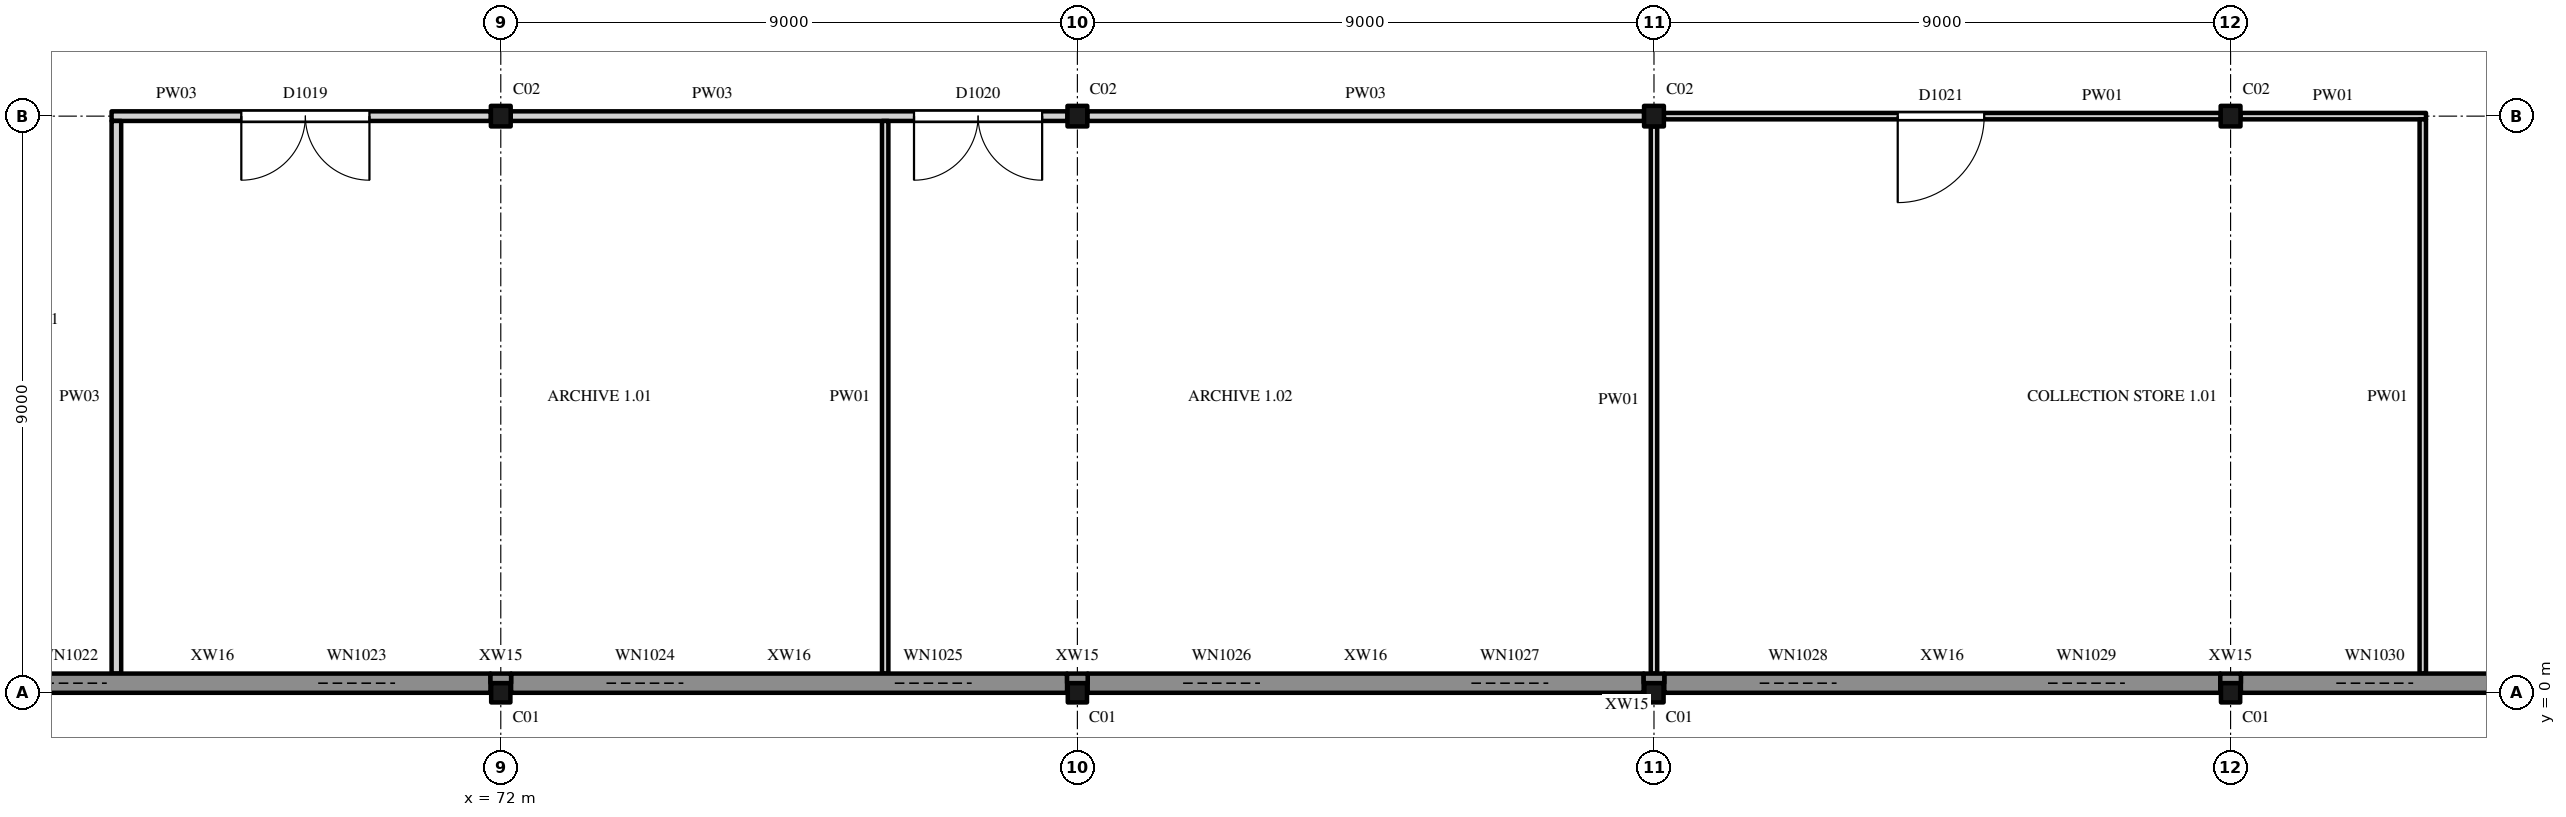
"""IFC4 building model, lengths in metres.
Left out: names, types, materials, properties, quantities, classifications, styles, units other than length and angle.
Written with IfcOpenShell. Run it as: python <this file> out.ifc"""

import sys

from ifc_helpers import new_model, si_unit, direction, frame, frame_2d, origin, origin_2d, place, context, subcontext, project, spatial, rectangle, hollow_rectangle, i_section, extrude, element, fill, save


model = new_model("IFC4")
c1 = context("Model", 3, precision=1e-05, world=origin(), true_north=direction((0.0, 1.0)))
c2 = subcontext(c1, "Body", "Model", "MODEL_VIEW")
j1 = project(units=[si_unit("LENGTHUNIT", "METRE"), si_unit("PLANEANGLEUNIT", "RADIAN")], contexts=[c1])
p1 = place(None, origin())
s1 = spatial("IfcSite", under=j1, at=p1, CompositionType="ELEMENT")
p2 = place(p1, origin())
s2 = spatial("IfcBuilding", under=s1, at=p2, CompositionType="ELEMENT")
p3 = place(p2, frame((0.0, 0.0, 6.0)))
s3 = spatial("IfcBuildingStorey", under=s2, at=p3, CompositionType="ELEMENT", Elevation=6.0)
for number, where, z_axis, x_axis in (
    (1, (72.0, 0.0, 0.0), (0.0, 0.0, 1.0), (1.0, 0.0, 0.0)),
    (2, (81.0, 0.0, 0.0), (0.0, 0.0, 1.0), (1.0, 0.0, 0.0)),
    (3, (90.0, 0.0, 0.0), (0.0, 0.0, 1.0), (1.0, 0.0, 0.0)),
    (4, (99.0, 0.0, 0.0), (0.0, 0.0, 1.0), (1.0, 0.0, 0.0)),
):
    element("IfcColumn", number, at=place(p3, frame(where, z_axis=z_axis, x_axis=x_axis)), inside=s3, PredefinedType="COLUMN", context=c2, shape_type="SweptSolid", body=[
        extrude(hollow_rectangle(XDim=0.3, YDim=0.3, WallThickness=0.012, InnerFilletRadius=0.019, OuterFilletRadius=0.031, at=origin_2d()), origin(), (0.0, 0.0, 1.0), 5.0),
    ])
for number, where, z_axis, x_axis in (
    (5, (72.0, 9.0, 0.0), (0.0, 0.0, 1.0), (1.0, 0.0, 0.0)),
    (6, (81.0, 9.0, 0.0), (0.0, 0.0, 1.0), (1.0, 0.0, 0.0)),
    (7, (90.0, 9.0, 0.0), (0.0, 0.0, 1.0), (1.0, 0.0, 0.0)),
    (8, (99.0, 9.0, 0.0), (0.0, 0.0, 1.0), (1.0, 0.0, 0.0)),
):
    element("IfcColumn", number, at=place(p3, frame(where, z_axis=z_axis, x_axis=x_axis)), inside=s3, PredefinedType="COLUMN", context=c2, shape_type="SweptSolid", body=[
        extrude(i_section(OverallWidth=0.309, OverallDepth=0.321, WebThickness=0.014, FlangeThickness=0.022, FilletRadius=0.017, at=origin_2d()), origin(), (0.0, 0.0, 1.0), 5.0),
    ])
p4 = place(p3, frame((63.172, 0.15, 0.0), z_axis=(0.0, 0.0, 1.0), x_axis=(1.0, 0.0, 0.0)))
e9 = element("IfcWall", 9, at=p4, inside=s3, PredefinedType="SOLIDWALL", context=c2, shape_type="SweptSolid", body=[
    extrude(rectangle(XDim=8.667, YDim=0.3, at=frame_2d((4.333, 0.0))), origin(), (0.0, 0.0, 1.0), 4.419),
])
p5 = place(p4, frame((1.478, 0.0, 1.2)))
e10 = element("IfcOpeningElement", 10, at=p5, cuts=e9, PredefinedType="OPENING", context=c2, shape_type="SweptSolid", body=[
    extrude(rectangle(XDim=1.2, YDim=1.5, at=frame_2d((0.6, 0.75))), frame((0.0, 0.16, 0.0), z_axis=(0.0, -1.0, 0.0), x_axis=(1.0, 0.0, 0.0)), (0.0, 0.0, 1.0), 0.32),
])
p6 = place(p4, frame((5.978, 0.0, 1.2)))
e11 = element("IfcOpeningElement", 11, at=p6, cuts=e9, PredefinedType="OPENING", context=c2, shape_type="SweptSolid", body=[
    extrude(rectangle(XDim=1.2, YDim=1.5, at=frame_2d((0.6, 0.75))), frame((0.0, 0.16, 0.0), z_axis=(0.0, -1.0, 0.0), x_axis=(1.0, 0.0, 0.0)), (0.0, 0.0, 1.0), 0.32),
])
p7 = place(p3, frame((72.161, 0.15, 0.0), z_axis=(0.0, 0.0, 1.0), x_axis=(1.0, 0.0, 0.0)))
e12 = element("IfcWall", 12, at=p7, inside=s3, PredefinedType="SOLIDWALL", context=c2, shape_type="SweptSolid", body=[
    extrude(rectangle(XDim=8.678, YDim=0.3, at=frame_2d((4.339, 0.0))), origin(), (0.0, 0.0, 1.0), 4.419),
])
p8 = place(p7, frame((1.489, 0.0, 1.2)))
e13 = element("IfcOpeningElement", 13, at=p8, cuts=e12, PredefinedType="OPENING", context=c2, shape_type="SweptSolid", body=[
    extrude(rectangle(XDim=1.2, YDim=1.5, at=frame_2d((0.6, 0.75))), frame((0.0, 0.16, 0.0), z_axis=(0.0, -1.0, 0.0), x_axis=(1.0, 0.0, 0.0)), (0.0, 0.0, 1.0), 0.32),
])
p9 = place(p7, frame((5.989, 0.0, 1.2)))
e14 = element("IfcOpeningElement", 14, at=p9, cuts=e12, PredefinedType="OPENING", context=c2, shape_type="SweptSolid", body=[
    extrude(rectangle(XDim=1.2, YDim=1.5, at=frame_2d((0.6, 0.75))), frame((0.0, 0.16, 0.0), z_axis=(0.0, -1.0, 0.0), x_axis=(1.0, 0.0, 0.0)), (0.0, 0.0, 1.0), 0.32),
])
p10 = place(p3, frame((81.161, 0.15, 0.0), z_axis=(0.0, 0.0, 1.0), x_axis=(1.0, 0.0, 0.0)))
e15 = element("IfcWall", 15, at=p10, inside=s3, PredefinedType="SOLIDWALL", context=c2, shape_type="SweptSolid", body=[
    extrude(rectangle(XDim=8.678, YDim=0.3, at=frame_2d((4.339, 0.0))), origin(), (0.0, 0.0, 1.0), 4.419),
])
p11 = place(p10, frame((1.489, 0.0, 1.2)))
e16 = element("IfcOpeningElement", 16, at=p11, cuts=e15, PredefinedType="OPENING", context=c2, shape_type="SweptSolid", body=[
    extrude(rectangle(XDim=1.2, YDim=1.5, at=frame_2d((0.6, 0.75))), frame((0.0, 0.16, 0.0), z_axis=(0.0, -1.0, 0.0), x_axis=(1.0, 0.0, 0.0)), (0.0, 0.0, 1.0), 0.32),
])
p12 = place(p10, frame((5.989, 0.0, 1.2)))
e17 = element("IfcOpeningElement", 17, at=p12, cuts=e15, PredefinedType="OPENING", context=c2, shape_type="SweptSolid", body=[
    extrude(rectangle(XDim=1.2, YDim=1.5, at=frame_2d((0.6, 0.75))), frame((0.0, 0.16, 0.0), z_axis=(0.0, -1.0, 0.0), x_axis=(1.0, 0.0, 0.0)), (0.0, 0.0, 1.0), 0.32),
])
p13 = place(p3, frame((90.161, 0.15, 0.0), z_axis=(0.0, 0.0, 1.0), x_axis=(1.0, 0.0, 0.0)))
e18 = element("IfcWall", 18, at=p13, inside=s3, PredefinedType="SOLIDWALL", context=c2, shape_type="SweptSolid", body=[
    extrude(rectangle(XDim=8.678, YDim=0.3, at=frame_2d((4.339, 0.0))), origin(), (0.0, 0.0, 1.0), 4.419),
])
p14 = place(p13, frame((1.489, 0.0, 1.2)))
e19 = element("IfcOpeningElement", 19, at=p14, cuts=e18, PredefinedType="OPENING", context=c2, shape_type="SweptSolid", body=[
    extrude(rectangle(XDim=1.2, YDim=1.5, at=frame_2d((0.6, 0.75))), frame((0.0, 0.16, 0.0), z_axis=(0.0, -1.0, 0.0), x_axis=(1.0, 0.0, 0.0)), (0.0, 0.0, 1.0), 0.32),
])
p15 = place(p13, frame((5.989, 0.0, 1.2)))
e20 = element("IfcOpeningElement", 20, at=p15, cuts=e18, PredefinedType="OPENING", context=c2, shape_type="SweptSolid", body=[
    extrude(rectangle(XDim=1.2, YDim=1.5, at=frame_2d((0.6, 0.75))), frame((0.0, 0.16, 0.0), z_axis=(0.0, -1.0, 0.0), x_axis=(1.0, 0.0, 0.0)), (0.0, 0.0, 1.0), 0.32),
])
p16 = place(p3, frame((99.161, 0.15, 0.0), z_axis=(0.0, 0.0, 1.0), x_axis=(1.0, 0.0, 0.0)))
e21 = element("IfcWall", 21, at=p16, inside=s3, PredefinedType="SOLIDWALL", context=c2, shape_type="SweptSolid", body=[
    extrude(rectangle(XDim=8.667, YDim=0.3, at=frame_2d((4.333, 0.0))), origin(), (0.0, 0.0, 1.0), 4.419),
])
p17 = place(p16, frame((1.489, 0.0, 1.2)))
e22 = element("IfcOpeningElement", 22, at=p17, cuts=e21, PredefinedType="OPENING", context=c2, shape_type="SweptSolid", body=[
    extrude(rectangle(XDim=1.2, YDim=1.5, at=frame_2d((0.6, 0.75))), frame((0.0, 0.16, 0.0), z_axis=(0.0, -1.0, 0.0), x_axis=(1.0, 0.0, 0.0)), (0.0, 0.0, 1.0), 0.32),
])
p18 = place(p16, frame((5.989, 0.0, 1.2)))
e23 = element("IfcOpeningElement", 23, at=p18, cuts=e21, PredefinedType="OPENING", context=c2, shape_type="SweptSolid", body=[
    extrude(rectangle(XDim=1.2, YDim=1.5, at=frame_2d((0.6, 0.75))), frame((0.0, 0.16, 0.0), z_axis=(0.0, -1.0, 0.0), x_axis=(1.0, 0.0, 0.0)), (0.0, 0.0, 1.0), 0.32),
])
for number, where, z_axis, x_axis in (
    (24, (71.839, 0.225, 0.0), (0.0, 0.0, 1.0), (1.0, 0.0, 0.0)),
    (25, (80.839, 0.225, 0.0), (0.0, 0.0, 1.0), (1.0, 0.0, 0.0)),
    (26, (89.839, 0.225, 0.0), (0.0, 0.0, 1.0), (1.0, 0.0, 0.0)),
    (27, (98.839, 0.225, 0.0), (0.0, 0.0, 1.0), (1.0, 0.0, 0.0)),
):
    element("IfcWall", number, at=place(p3, frame(where, z_axis=z_axis, x_axis=x_axis)), inside=s3, PredefinedType="SOLIDWALL", context=c2, shape_type="SweptSolid", body=[
        extrude(rectangle(XDim=0.322, YDim=0.15, at=frame_2d((0.161, 0.0))), origin(), (0.0, 0.0, 1.0), 4.419),
    ])
p19 = place(p3, frame((65.925, 9.0, 0.0), z_axis=(0.0, 0.0, 1.0), x_axis=(1.0, 0.0, 0.0)))
e28 = element("IfcWall", 28, at=p19, inside=s3, PredefinedType="PARTITIONING", context=c2, shape_type="SweptSolid", body=[
    extrude(rectangle(XDim=5.92, YDim=0.15, at=frame_2d((2.96, 0.0))), origin(), (0.0, 0.0, 1.0), 4.419),
])
p20 = place(p19, frame((2.025, 0.0, 0.0)))
e29 = element("IfcOpeningElement", 29, at=p20, cuts=e28, PredefinedType="OPENING", context=c2, shape_type="SweptSolid", body=[
    extrude(rectangle(XDim=2.0, YDim=2.4, at=frame_2d((1.0, 1.2))), frame((0.0, 0.085, 0.0), z_axis=(0.0, -1.0, 0.0), x_axis=(1.0, 0.0, 0.0)), (0.0, 0.0, 1.0), 0.17),
])
p21 = place(p3, frame((72.155, 9.0, 0.0), z_axis=(0.0, 0.0, 1.0), x_axis=(1.0, 0.0, 0.0)))
e30 = element("IfcWall", 30, at=p21, inside=s3, PredefinedType="PARTITIONING", context=c2, shape_type="SweptSolid", body=[
    extrude(rectangle(XDim=8.691, YDim=0.15, at=frame_2d((4.345, 0.0))), origin(), (0.0, 0.0, 1.0), 4.419),
])
p22 = place(p21, frame((6.295, 0.0, 0.0)))
e31 = element("IfcOpeningElement", 31, at=p22, cuts=e30, PredefinedType="OPENING", context=c2, shape_type="SweptSolid", body=[
    extrude(rectangle(XDim=2.0, YDim=2.4, at=frame_2d((1.0, 1.2))), frame((0.0, 0.085, 0.0), z_axis=(0.0, -1.0, 0.0), x_axis=(1.0, 0.0, 0.0)), (0.0, 0.0, 1.0), 0.17),
])
p23 = place(p3, frame((81.155, 9.0, 0.0), z_axis=(0.0, 0.0, 1.0), x_axis=(1.0, 0.0, 0.0)))
e32 = element("IfcWall", 32, at=p23, inside=s3, PredefinedType="PARTITIONING", context=c2, shape_type="SweptSolid", body=[
    extrude(rectangle(XDim=8.691, YDim=0.15, at=frame_2d((4.345, 0.0))), origin(), (0.0, 0.0, 1.0), 4.419),
])
p24 = place(p3, frame((90.155, 9.0, 0.0), z_axis=(0.0, 0.0, 1.0), x_axis=(1.0, 0.0, 0.0)))
e33 = element("IfcWall", 33, at=p24, inside=s3, PredefinedType="PARTITIONING", context=c2, shape_type="SweptSolid", body=[
    extrude(rectangle(XDim=8.691, YDim=0.1, at=frame_2d((4.345, 0.0))), origin(), (0.0, 0.0, 1.0), 4.419),
])
p25 = place(p24, frame((3.65, 0.0, 0.0)))
e34 = element("IfcOpeningElement", 34, at=p25, cuts=e33, PredefinedType="OPENING", context=c2, shape_type="SweptSolid", body=[
    extrude(rectangle(XDim=1.35, YDim=2.4, at=frame_2d((0.675, 1.2))), frame((0.0, 0.06, 0.0), z_axis=(0.0, -1.0, 0.0), x_axis=(1.0, 0.0, 0.0)), (0.0, 0.0, 1.0), 0.12),
])
p26 = place(p3, frame((99.155, 9.0, 0.0), z_axis=(0.0, 0.0, 1.0), x_axis=(1.0, 0.0, 0.0)))
e35 = element("IfcWall", 35, at=p26, inside=s3, PredefinedType="PARTITIONING", context=c2, shape_type="SweptSolid", body=[
    extrude(rectangle(XDim=2.896, YDim=0.1, at=frame_2d((1.448, 0.0))), origin(), (0.0, 0.0, 1.0), 4.419),
])
p27 = place(p3, frame((66.0, 0.3, 0.0), z_axis=(0.0, 0.0, 1.0), x_axis=(0.0, 1.0, 0.0)))
e36 = element("IfcWall", 36, at=p27, inside=s3, PredefinedType="PARTITIONING", context=c2, shape_type="SweptSolid", body=[
    extrude(rectangle(XDim=8.625, YDim=0.15, at=frame_2d((4.312, 0.0))), origin(), (0.0, 0.0, 1.0), 4.825),
])
p28 = place(p3, frame((78.0, 0.3, 0.0), z_axis=(0.0, 0.0, 1.0), x_axis=(0.0, 1.0, 0.0)))
e37 = element("IfcWall", 37, at=p28, inside=s3, PredefinedType="PARTITIONING", context=c2, shape_type="SweptSolid", body=[
    extrude(rectangle(XDim=8.625, YDim=0.1, at=frame_2d((4.312, 0.0))), origin(), (0.0, 0.0, 1.0), 4.825),
])
p29 = place(p3, frame((90.0, 0.3, 0.0), z_axis=(0.0, 0.0, 1.0), x_axis=(0.0, 1.0, 0.0)))
e38 = element("IfcWall", 38, at=p29, inside=s3, PredefinedType="PARTITIONING", context=c2, shape_type="SweptSolid", body=[
    extrude(rectangle(XDim=8.54, YDim=0.1, at=frame_2d((4.27, 0.0))), origin(), (0.0, 0.0, 1.0), 4.297),
])
p30 = place(p3, frame((102.0, 0.3, 0.0), z_axis=(0.0, 0.0, 1.0), x_axis=(0.0, 1.0, 0.0)))
e39 = element("IfcWall", 39, at=p30, inside=s3, PredefinedType="PARTITIONING", context=c2, shape_type="SweptSolid", body=[
    extrude(rectangle(XDim=8.65, YDim=0.1, at=frame_2d((4.325, 0.0))), origin(), (0.0, 0.0, 1.0), 4.825),
])
p31 = place(p5, origin())
e40 = element("IfcWindow", 40, at=p31, inside=s3, PartitioningType="SINGLE_PANEL", PredefinedType="WINDOW", context=c2, shape_type="SweptSolid", body=[
    extrude(rectangle(XDim=1.2, YDim=1.5, at=frame_2d((0.6, 0.75))), frame((0.0, 0.03, 0.0), z_axis=(0.0, -1.0, 0.0), x_axis=(1.0, 0.0, 0.0)), (0.0, 0.0, 1.0), 0.06),
])
fill(e10, e40)
p32 = place(p6, origin())
e41 = element("IfcWindow", 41, at=p32, inside=s3, PartitioningType="SINGLE_PANEL", PredefinedType="WINDOW", context=c2, shape_type="SweptSolid", body=[
    extrude(rectangle(XDim=1.2, YDim=1.5, at=frame_2d((0.6, 0.75))), frame((0.0, 0.03, 0.0), z_axis=(0.0, -1.0, 0.0), x_axis=(1.0, 0.0, 0.0)), (0.0, 0.0, 1.0), 0.06),
])
fill(e11, e41)
p33 = place(p8, origin())
e42 = element("IfcWindow", 42, at=p33, inside=s3, PartitioningType="SINGLE_PANEL", PredefinedType="WINDOW", context=c2, shape_type="SweptSolid", body=[
    extrude(rectangle(XDim=1.2, YDim=1.5, at=frame_2d((0.6, 0.75))), frame((0.0, 0.03, 0.0), z_axis=(0.0, -1.0, 0.0), x_axis=(1.0, 0.0, 0.0)), (0.0, 0.0, 1.0), 0.06),
])
fill(e13, e42)
p34 = place(p9, origin())
e43 = element("IfcWindow", 43, at=p34, inside=s3, PartitioningType="SINGLE_PANEL", PredefinedType="WINDOW", context=c2, shape_type="SweptSolid", body=[
    extrude(rectangle(XDim=1.2, YDim=1.5, at=frame_2d((0.6, 0.75))), frame((0.0, 0.03, 0.0), z_axis=(0.0, -1.0, 0.0), x_axis=(1.0, 0.0, 0.0)), (0.0, 0.0, 1.0), 0.06),
])
fill(e14, e43)
p35 = place(p11, origin())
e44 = element("IfcWindow", 44, at=p35, inside=s3, PartitioningType="SINGLE_PANEL", PredefinedType="WINDOW", context=c2, shape_type="SweptSolid", body=[
    extrude(rectangle(XDim=1.2, YDim=1.5, at=frame_2d((0.6, 0.75))), frame((0.0, 0.03, 0.0), z_axis=(0.0, -1.0, 0.0), x_axis=(1.0, 0.0, 0.0)), (0.0, 0.0, 1.0), 0.06),
])
fill(e16, e44)
p36 = place(p12, origin())
e45 = element("IfcWindow", 45, at=p36, inside=s3, PartitioningType="SINGLE_PANEL", PredefinedType="WINDOW", context=c2, shape_type="SweptSolid", body=[
    extrude(rectangle(XDim=1.2, YDim=1.5, at=frame_2d((0.6, 0.75))), frame((0.0, 0.03, 0.0), z_axis=(0.0, -1.0, 0.0), x_axis=(1.0, 0.0, 0.0)), (0.0, 0.0, 1.0), 0.06),
])
fill(e17, e45)
p37 = place(p14, origin())
e46 = element("IfcWindow", 46, at=p37, inside=s3, PartitioningType="SINGLE_PANEL", PredefinedType="WINDOW", context=c2, shape_type="SweptSolid", body=[
    extrude(rectangle(XDim=1.2, YDim=1.5, at=frame_2d((0.6, 0.75))), frame((0.0, 0.03, 0.0), z_axis=(0.0, -1.0, 0.0), x_axis=(1.0, 0.0, 0.0)), (0.0, 0.0, 1.0), 0.06),
])
fill(e19, e46)
p38 = place(p15, origin())
e47 = element("IfcWindow", 47, at=p38, inside=s3, PartitioningType="SINGLE_PANEL", PredefinedType="WINDOW", context=c2, shape_type="SweptSolid", body=[
    extrude(rectangle(XDim=1.2, YDim=1.5, at=frame_2d((0.6, 0.75))), frame((0.0, 0.03, 0.0), z_axis=(0.0, -1.0, 0.0), x_axis=(1.0, 0.0, 0.0)), (0.0, 0.0, 1.0), 0.06),
])
fill(e20, e47)
p39 = place(p17, origin())
e48 = element("IfcWindow", 48, at=p39, inside=s3, PartitioningType="SINGLE_PANEL", PredefinedType="WINDOW", context=c2, shape_type="SweptSolid", body=[
    extrude(rectangle(XDim=1.2, YDim=1.5, at=frame_2d((0.6, 0.75))), frame((0.0, 0.03, 0.0), z_axis=(0.0, -1.0, 0.0), x_axis=(1.0, 0.0, 0.0)), (0.0, 0.0, 1.0), 0.06),
])
fill(e22, e48)
p40 = place(p20, origin())
e49 = element("IfcDoor", 49, at=p40, inside=s3, OperationType="DOUBLE_DOOR_SINGLE_SWING", PredefinedType="DOOR", context=c2, shape_type="SweptSolid", body=[
    extrude(rectangle(XDim=2.0, YDim=2.4, at=frame_2d((1.0, 1.2))), frame((0.0, 0.025, 0.0), z_axis=(0.0, -1.0, 0.0), x_axis=(1.0, 0.0, 0.0)), (0.0, 0.0, 1.0), 0.05),
])
fill(e29, e49)
p41 = place(p22, origin())
e50 = element("IfcDoor", 50, at=p41, inside=s3, OperationType="DOUBLE_DOOR_SINGLE_SWING", PredefinedType="DOOR", context=c2, shape_type="SweptSolid", body=[
    extrude(rectangle(XDim=2.0, YDim=2.4, at=frame_2d((1.0, 1.2))), frame((0.0, 0.025, 0.0), z_axis=(0.0, -1.0, 0.0), x_axis=(1.0, 0.0, 0.0)), (0.0, 0.0, 1.0), 0.05),
])
fill(e31, e50)
p42 = place(p25, origin())
e51 = element("IfcDoor", 51, at=p42, inside=s3, OperationType="SINGLE_SWING_LEFT", PredefinedType="DOOR", context=c2, shape_type="SweptSolid", body=[
    extrude(rectangle(XDim=1.35, YDim=2.4, at=frame_2d((0.675, 1.2))), frame((0.0, 0.025, 0.0), z_axis=(0.0, -1.0, 0.0), x_axis=(1.0, 0.0, 0.0)), (0.0, 0.0, 1.0), 0.05),
])
fill(e34, e51)
save(model, sys.argv[1])
